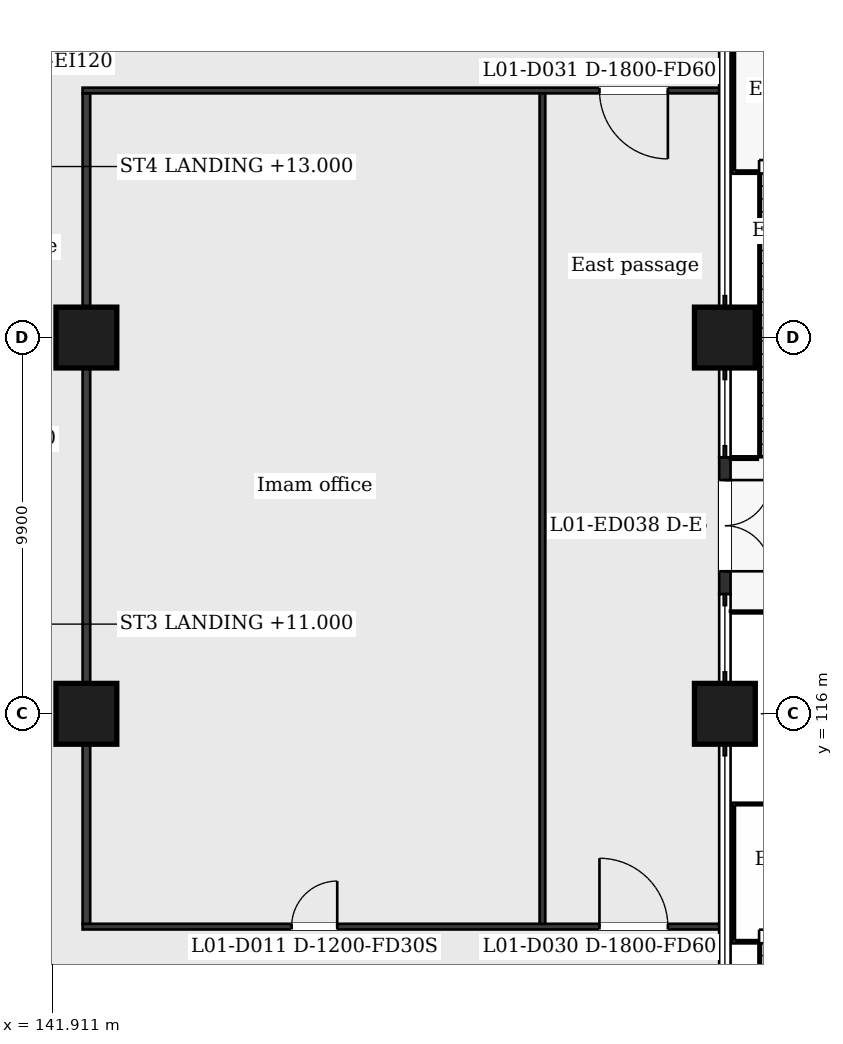
"""IFC4 building model, lengths in metres.
Left out: names, types, materials, properties, quantities, classifications, styles, units other than length and angle.
Written with IfcOpenShell. Run it as: python <this file> out.ifc"""

import sys

from ifc_helpers import new_model, si_unit, direction, frame, frame_2d, origin, origin_2d, place, context, subcontext, project, spatial, rectangle, extrude, element, fill, save


model = new_model("IFC4")
c1 = context("Model", 3, precision=1e-05, world=origin(), true_north=direction((0.0, 1.0)))
c2 = subcontext(c1, "Body", "Model", "MODEL_VIEW")
j1 = project(units=[si_unit("LENGTHUNIT", "METRE"), si_unit("PLANEANGLEUNIT", "RADIAN")], contexts=[c1])
p1 = place(None, origin())
s1 = spatial("IfcSite", under=j1, at=p1, CompositionType="ELEMENT")
p2 = place(p1, origin())
s2 = spatial("IfcBuilding", under=s1, at=p2, CompositionType="ELEMENT")
p3 = place(p2, frame((0.0, 0.0, 9.0)))
s3 = spatial("IfcBuildingStorey", under=s2, at=p3, CompositionType="ELEMENT", Elevation=9.0)
for number, where, z_axis, x_axis in (
    (1, (142.8, 116.0, 0.0), (0.0, 0.0, 1.0), (1.0, 0.0, 0.0)),
    (2, (159.6, 116.0, 0.0), (0.0, 0.0, 1.0), (1.0, 0.0, 0.0)),
    (3, (142.8, 125.9, 0.0), (0.0, 0.0, 1.0), (1.0, 0.0, 0.0)),
    (4, (159.6, 125.9, 0.0), (0.0, 0.0, 1.0), (1.0, 0.0, 0.0)),
):
    element("IfcColumn", number, at=place(p3, frame(where, z_axis=z_axis, x_axis=x_axis)), inside=s3, PredefinedType="COLUMN", context=c2, shape_type="SweptSolid", body=[
        extrude(rectangle(XDim=1.6, YDim=1.6, at=origin_2d()), origin(), (0.0, 0.0, 1.0), 8.0),
    ])
p4 = place(p3, frame((159.6, 122.75, 0.0), z_axis=(0.0, 0.0, 1.0), x_axis=(0.0, -1.0, 0.0)))
e5 = element("IfcWall", 5, at=p4, inside=s3, PredefinedType="SOLIDWALL", context=c2, shape_type="SweptSolid", body=[
    extrude(rectangle(XDim=3.6, YDim=0.3, at=frame_2d((1.8, 0.0))), origin(), (0.0, 0.0, 1.0), 7.1),
])
p5 = place(p4, frame((0.6, 0.0, 0.0)))
e6 = element("IfcOpeningElement", 6, at=p5, cuts=e5, PredefinedType="OPENING", context=c2, shape_type="SweptSolid", body=[
    extrude(rectangle(XDim=2.4, YDim=2.4, at=frame_2d((1.2, 1.2))), frame((0.0, 0.16, 0.0), z_axis=(0.0, -1.0, 0.0), x_axis=(1.0, 0.0, 0.0)), (0.0, 0.0, 1.0), 0.32),
])
p6 = place(p3, frame((142.7, 110.4, 0.0), z_axis=(0.0, 0.0, 1.0), x_axis=(1.0, 0.0, 0.0)))
e7 = element("IfcWall", 7, at=p6, inside=s3, PredefinedType="PARTITIONING", context=c2, shape_type="SweptSolid", body=[
    extrude(rectangle(XDim=16.85, YDim=0.15, at=frame_2d((8.425, 0.0))), origin(), (0.0, 0.0, 1.0), 7.5),
])
p7 = place(p6, frame((5.5, 0.0, 0.0)))
e8 = element("IfcOpeningElement", 8, at=p7, cuts=e7, PredefinedType="OPENING", context=c2, shape_type="SweptSolid", body=[
    extrude(rectangle(XDim=1.2, YDim=2.1, at=frame_2d((0.6, 1.05))), frame((0.0, 0.085, 0.0), z_axis=(0.0, -1.0, 0.0), x_axis=(1.0, 0.0, 0.0)), (0.0, 0.0, 1.0), 0.17),
])
p8 = place(p6, frame((13.6, 0.0, 0.0)))
e9 = element("IfcOpeningElement", 9, at=p8, cuts=e7, PredefinedType="OPENING", context=c2, shape_type="SweptSolid", body=[
    extrude(rectangle(XDim=1.8, YDim=2.1, at=frame_2d((0.9, 1.05))), frame((0.0, 0.085, 0.0), z_axis=(0.0, -1.0, 0.0), x_axis=(1.0, 0.0, 0.0)), (0.0, 0.0, 1.0), 0.17),
])
p9 = place(p3, frame((142.7, 132.4, 0.0), z_axis=(0.0, 0.0, 1.0), x_axis=(1.0, 0.0, 0.0)))
e10 = element("IfcWall", 10, at=p9, inside=s3, PredefinedType="PARTITIONING", context=c2, shape_type="SweptSolid", body=[
    extrude(rectangle(XDim=16.85, YDim=0.15, at=frame_2d((8.425, 0.0))), origin(), (0.0, 0.0, 1.0), 7.5),
])
p10 = place(p9, frame((13.6, 0.0, 0.0)))
e11 = element("IfcOpeningElement", 11, at=p10, cuts=e10, PredefinedType="OPENING", context=c2, shape_type="SweptSolid", body=[
    extrude(rectangle(XDim=1.8, YDim=2.1, at=frame_2d((0.9, 1.05))), frame((0.0, 0.085, 0.0), z_axis=(0.0, -1.0, 0.0), x_axis=(1.0, 0.0, 0.0)), (0.0, 0.0, 1.0), 0.17),
])
p11 = place(p3, frame((142.8, 110.475, 0.0), z_axis=(0.0, 0.0, 1.0), x_axis=(0.0, 1.0, 0.0)))
e12 = element("IfcWall", 12, at=p11, inside=s3, PredefinedType="PARTITIONING", context=c2, shape_type="SweptSolid", body=[
    extrude(rectangle(XDim=21.85, YDim=0.2, at=frame_2d((10.925, 0.0))), origin(), (0.0, 0.0, 1.0), 7.5),
])
p12 = place(p3, frame((154.8, 110.475, 0.0), z_axis=(0.0, 0.0, 1.0), x_axis=(0.0, 1.0, 0.0)))
e13 = element("IfcWall", 13, at=p12, inside=s3, PredefinedType="PARTITIONING", context=c2, shape_type="SweptSolid", body=[
    extrude(rectangle(XDim=21.85, YDim=0.15, at=frame_2d((10.925, 0.0))), origin(), (0.0, 0.0, 1.0), 7.5),
])
p13 = place(p5, origin())
e14 = element("IfcDoor", 14, at=p13, inside=s3, OperationType="DOUBLE_DOOR_DOUBLE_SWING", PredefinedType="DOOR", context=c2, shape_type="SweptSolid", body=[
    extrude(rectangle(XDim=2.4, YDim=2.4, at=frame_2d((1.2, 1.2))), frame((0.0, 0.025, 0.0), z_axis=(0.0, -1.0, 0.0), x_axis=(1.0, 0.0, 0.0)), (0.0, 0.0, 1.0), 0.05),
])
fill(e6, e14)
p14 = place(p7, origin())
e15 = element("IfcDoor", 15, at=p14, inside=s3, OperationType="SINGLE_SWING_RIGHT", PredefinedType="DOOR", context=c2, shape_type="SweptSolid", body=[
    extrude(rectangle(XDim=1.2, YDim=2.1, at=frame_2d((0.6, 1.05))), frame((0.0, 0.025, 0.0), z_axis=(0.0, -1.0, 0.0), x_axis=(1.0, 0.0, 0.0)), (0.0, 0.0, 1.0), 0.05),
])
fill(e8, e15)
p15 = place(p8, origin())
e16 = element("IfcDoor", 16, at=p15, inside=s3, OperationType="SINGLE_SWING_LEFT", PredefinedType="DOOR", context=c2, shape_type="SweptSolid", body=[
    extrude(rectangle(XDim=1.8, YDim=2.1, at=frame_2d((0.9, 1.05))), frame((0.0, 0.025, 0.0), z_axis=(0.0, -1.0, 0.0), x_axis=(1.0, 0.0, 0.0)), (0.0, 0.0, 1.0), 0.05),
])
fill(e9, e16)
p16 = place(p10, origin())
e17 = element("IfcDoor", 17, at=p16, inside=s3, OperationType="SINGLE_SWING_RIGHT", PredefinedType="DOOR", context=c2, shape_type="SweptSolid", body=[
    extrude(rectangle(XDim=1.8, YDim=2.1, at=frame_2d((0.9, 1.05))), frame((0.0, 0.025, 0.0), z_axis=(0.0, -1.0, 0.0), x_axis=(1.0, 0.0, 0.0)), (0.0, 0.0, 1.0), 0.05),
])
fill(e11, e17)
save(model, sys.argv[1])
